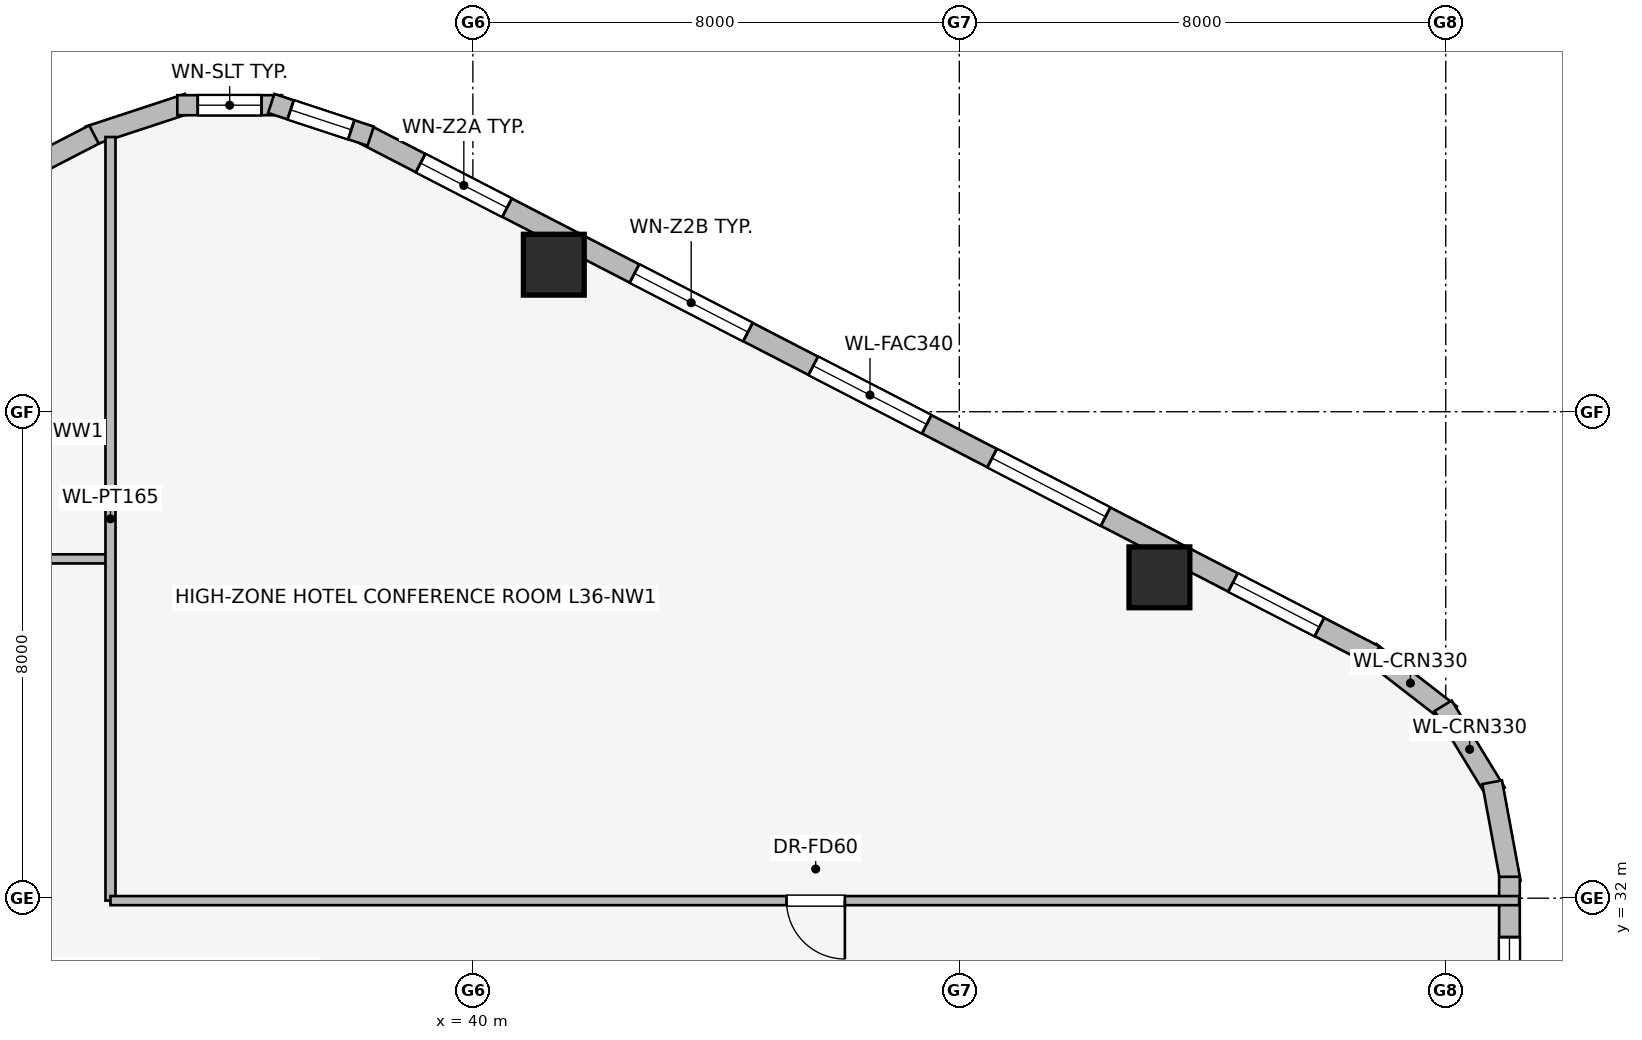
"""IFC4 building model, lengths in metres.
Left out: names, types, materials, properties, quantities, classifications, styles, units other than length and angle.
Written with IfcOpenShell. Run it as: python <this file> out.ifc"""

import sys

from ifc_helpers import new_model, si_unit, direction, frame, frame_2d, origin, origin_2d, place, context, subcontext, project, spatial, rectangle, extrude, element, fill, save


model = new_model("IFC4")
c1 = context("Model", 3, precision=1e-05, world=origin(), true_north=direction((0.0, 1.0)))
c2 = subcontext(c1, "Body", "Model", "MODEL_VIEW")
j1 = project(units=[si_unit("LENGTHUNIT", "METRE"), si_unit("PLANEANGLEUNIT", "RADIAN")], contexts=[c1])
p1 = place(None, origin())
s1 = spatial("IfcSite", under=j1, at=p1, CompositionType="ELEMENT")
p2 = place(p1, origin())
s2 = spatial("IfcBuilding", under=s1, at=p2, CompositionType="ELEMENT")
p3 = place(p2, frame((0.0, 0.0, 136.05)))
s3 = spatial("IfcBuildingStorey", under=s2, at=p3, CompositionType="ELEMENT", Elevation=136.05)
for number, where, z_axis, x_axis in (
    (1, (51.291, 37.277, 0.0), (0.0, 0.0, 1.0), (1.0, 0.0, 0.0)),
    (2, (41.331, 42.418, 0.0), (0.0, 0.0, 1.0), (1.0, 0.0, 0.0)),
):
    element("IfcColumn", number, at=place(p3, frame(where, z_axis=z_axis, x_axis=x_axis)), inside=s3, PredefinedType="COLUMN", context=c2, shape_type="SweptSolid", body=[
        extrude(rectangle(XDim=1.0, YDim=1.0, at=origin_2d()), origin(), (0.0, 0.0, 1.0), 3.45),
    ])
p4 = place(p3, frame((54.757, 36.05, 0.0), z_axis=(0.0, 0.0, 1.0), x_axis=(0.790621329885, -0.612305408053, 0.0)))
e3 = element("IfcWall", 3, at=p4, inside=s3, PredefinedType="STANDARD", context=c2, shape_type="SweptSolid", body=[
    extrude(rectangle(XDim=1.676, YDim=0.33, at=frame_2d((0.838, 0.0))), origin(), (0.0, 0.0, 1.0), 3.16),
])
p5 = place(p3, frame((55.957, 35.164, 0.0), z_axis=(0.0, 0.0, 1.0), x_axis=(0.520519429557, -0.853849824883, 0.0)))
e4 = element("IfcWall", 4, at=p5, inside=s3, PredefinedType="STANDARD", context=c2, shape_type="SweptSolid", body=[
    extrude(rectangle(XDim=1.677, YDim=0.33, at=frame_2d((0.839, 0.0))), origin(), (0.0, 0.0, 1.0), 3.16),
])
p6 = place(p3, frame((56.763, 33.907, 0.0), z_axis=(0.0, 0.0, 1.0), x_axis=(0.181984991895, -0.983301308209, 0.0)))
e5 = element("IfcWall", 5, at=p6, inside=s3, PredefinedType="STANDARD", context=c2, shape_type="SweptSolid", body=[
    extrude(rectangle(XDim=1.677, YDim=0.33, at=frame_2d((0.838, 0.0))), origin(), (0.0, 0.0, 1.0), 3.16),
])
p7 = place(p3, frame((38.231, 44.558, 0.0), z_axis=(0.0, 0.0, 1.0), x_axis=(0.888613612362, -0.458656568606, 0.0)))
e6 = element("IfcWall", 6, at=p7, inside=s3, PredefinedType="STANDARD", context=c2, shape_type="SweptSolid", body=[
    extrude(rectangle(XDim=18.681, YDim=0.34, at=frame_2d((9.34, 0.0))), origin(), (0.0, 0.0, 1.0), 3.16),
])
p8 = place(p7, frame((1.023, 0.0, 0.75)))
e7 = element("IfcOpeningElement", 7, at=p8, cuts=e6, PredefinedType="OPENING", context=c2, shape_type="SweptSolid", body=[
    extrude(rectangle(XDim=1.6, YDim=1.55, at=frame_2d((0.8, 0.775))), frame((0.0, 0.18, 0.0), z_axis=(0.0, -1.0, 0.0), x_axis=(1.0, 0.0, 0.0)), (0.0, 0.0, 1.0), 0.36),
])
p9 = place(p7, frame((4.981, 0.0, 0.75)))
e8 = element("IfcOpeningElement", 8, at=p9, cuts=e6, PredefinedType="OPENING", context=c2, shape_type="SweptSolid", body=[
    extrude(rectangle(XDim=2.1, YDim=1.5, at=frame_2d((1.05, 0.75))), frame((0.0, 0.18, 0.0), z_axis=(0.0, -1.0, 0.0), x_axis=(1.0, 0.0, 0.0)), (0.0, 0.0, 1.0), 0.36),
])
p10 = place(p7, frame((8.29, 0.0, 0.75)))
e9 = element("IfcOpeningElement", 9, at=p10, cuts=e6, PredefinedType="OPENING", context=c2, shape_type="SweptSolid", body=[
    extrude(rectangle(XDim=2.1, YDim=1.5, at=frame_2d((1.05, 0.75))), frame((0.0, 0.18, 0.0), z_axis=(0.0, -1.0, 0.0), x_axis=(1.0, 0.0, 0.0)), (0.0, 0.0, 1.0), 0.36),
])
p11 = place(p7, frame((11.6, 0.0, 0.75)))
e10 = element("IfcOpeningElement", 10, at=p11, cuts=e6, PredefinedType="OPENING", context=c2, shape_type="SweptSolid", body=[
    extrude(rectangle(XDim=2.1, YDim=1.5, at=frame_2d((1.05, 0.75))), frame((0.0, 0.18, 0.0), z_axis=(0.0, -1.0, 0.0), x_axis=(1.0, 0.0, 0.0)), (0.0, 0.0, 1.0), 0.36),
])
p12 = place(p7, frame((16.058, 0.0, 0.75)))
e11 = element("IfcOpeningElement", 11, at=p12, cuts=e6, PredefinedType="OPENING", context=c2, shape_type="SweptSolid", body=[
    extrude(rectangle(XDim=1.6, YDim=1.55, at=frame_2d((0.8, 0.775))), frame((0.0, 0.18, 0.0), z_axis=(0.0, -1.0, 0.0), x_axis=(1.0, 0.0, 0.0)), (0.0, 0.0, 1.0), 0.36),
])
p13 = place(p3, frame((33.681, 44.532, 0.0), z_axis=(0.0, 0.0, 1.0), x_axis=(0.949937416267, 0.312440242569, 0.0)))
e12 = element("IfcWall", 12, at=p13, inside=s3, PredefinedType="STANDARD", context=c2, shape_type="SweptSolid", body=[
    extrude(rectangle(XDim=1.722, YDim=0.33, at=frame_2d((0.861, 0.0))), origin(), (0.0, 0.0, 1.0), 3.16),
])
p14 = place(p3, frame((35.139, 45.041, 0.0), z_axis=(0.0, 0.0, 1.0), x_axis=(1.0, 0.0, 0.0)))
e13 = element("IfcWall", 13, at=p14, inside=s3, PredefinedType="STANDARD", context=c2, shape_type="SweptSolid", body=[
    extrude(rectangle(XDim=1.722, YDim=0.33, at=frame_2d((0.861, 0.0))), origin(), (0.0, 0.0, 1.0), 3.16),
])
p15 = place(p14, frame((0.336, 0.0, 0.75)))
e14 = element("IfcOpeningElement", 14, at=p15, cuts=e13, PredefinedType="OPENING", context=c2, shape_type="SweptSolid", body=[
    extrude(rectangle(XDim=1.05, YDim=1.4, at=frame_2d((0.525, 0.7))), frame((0.0, 0.175, 0.0), z_axis=(0.0, -1.0, 0.0), x_axis=(1.0, 0.0, 0.0)), (0.0, 0.0, 1.0), 0.35),
])
p16 = place(p3, frame((36.683, 45.07, 0.0), z_axis=(0.0, 0.0, 1.0), x_axis=(0.949937416267, -0.312440242569, 0.0)))
e15 = element("IfcWall", 15, at=p16, inside=s3, PredefinedType="STANDARD", context=c2, shape_type="SweptSolid", body=[
    extrude(rectangle(XDim=1.722, YDim=0.33, at=frame_2d((0.861, 0.0))), origin(), (0.0, 0.0, 1.0), 3.16),
])
p17 = place(p16, frame((0.336, 0.0, 0.75)))
e16 = element("IfcOpeningElement", 16, at=p17, cuts=e15, PredefinedType="OPENING", context=c2, shape_type="SweptSolid", body=[
    extrude(rectangle(XDim=1.05, YDim=1.4, at=frame_2d((0.525, 0.7))), frame((0.0, 0.175, 0.0), z_axis=(0.0, -1.0, 0.0), x_axis=(1.0, 0.0, 0.0)), (0.0, 0.0, 1.0), 0.35),
])
p18 = place(p3, frame((17.169, 35.99, 0.0), z_axis=(0.0, 0.0, 1.0), x_axis=(0.888613612362, 0.458656568606, 0.0)))
e17 = element("IfcWall", 17, at=p18, inside=s3, PredefinedType="STANDARD", context=c2, shape_type="SweptSolid", body=[
    extrude(rectangle(XDim=18.681, YDim=0.34, at=frame_2d((9.34, 0.0))), origin(), (0.0, 0.0, 1.0), 3.16),
])
p19 = place(p18, frame((1.023, 0.0, 0.75)))
e18 = element("IfcOpeningElement", 18, at=p19, cuts=e17, PredefinedType="OPENING", context=c2, shape_type="SweptSolid", body=[
    extrude(rectangle(XDim=1.6, YDim=1.55, at=frame_2d((0.8, 0.775))), frame((0.0, 0.18, 0.0), z_axis=(0.0, -1.0, 0.0), x_axis=(1.0, 0.0, 0.0)), (0.0, 0.0, 1.0), 0.36),
])
p20 = place(p18, frame((4.981, 0.0, 0.75)))
e19 = element("IfcOpeningElement", 19, at=p20, cuts=e17, PredefinedType="OPENING", context=c2, shape_type="SweptSolid", body=[
    extrude(rectangle(XDim=2.1, YDim=1.5, at=frame_2d((1.05, 0.75))), frame((0.0, 0.18, 0.0), z_axis=(0.0, -1.0, 0.0), x_axis=(1.0, 0.0, 0.0)), (0.0, 0.0, 1.0), 0.36),
])
p21 = place(p18, frame((8.29, 0.0, 0.75)))
e20 = element("IfcOpeningElement", 20, at=p21, cuts=e17, PredefinedType="OPENING", context=c2, shape_type="SweptSolid", body=[
    extrude(rectangle(XDim=2.1, YDim=1.5, at=frame_2d((1.05, 0.75))), frame((0.0, 0.18, 0.0), z_axis=(0.0, -1.0, 0.0), x_axis=(1.0, 0.0, 0.0)), (0.0, 0.0, 1.0), 0.36),
])
p22 = place(p18, frame((11.6, 0.0, 0.75)))
e21 = element("IfcOpeningElement", 21, at=p22, cuts=e17, PredefinedType="OPENING", context=c2, shape_type="SweptSolid", body=[
    extrude(rectangle(XDim=2.1, YDim=1.5, at=frame_2d((1.05, 0.75))), frame((0.0, 0.18, 0.0), z_axis=(0.0, -1.0, 0.0), x_axis=(1.0, 0.0, 0.0)), (0.0, 0.0, 1.0), 0.36),
])
p23 = place(p18, frame((16.058, 0.0, 0.75)))
e22 = element("IfcOpeningElement", 22, at=p23, cuts=e17, PredefinedType="OPENING", context=c2, shape_type="SweptSolid", body=[
    extrude(rectangle(XDim=1.6, YDim=1.55, at=frame_2d((0.8, 0.775))), frame((0.0, 0.18, 0.0), z_axis=(0.0, -1.0, 0.0), x_axis=(1.0, 0.0, 0.0)), (0.0, 0.0, 1.0), 0.36),
])
p24 = place(p3, frame((57.048, 32.352, 0.0), z_axis=(0.0, 0.0, 1.0), x_axis=(0.0, -1.0, 0.0)))
e23 = element("IfcWall", 23, at=p24, inside=s3, PredefinedType="STANDARD", context=c2, shape_type="SweptSolid", body=[
    extrude(rectangle(XDim=16.704, YDim=0.34, at=frame_2d((8.352, 0.0))), origin(), (0.0, 0.0, 1.0), 3.16),
])
p25 = place(p24, frame((0.992, 0.0, 0.75)))
e24 = element("IfcOpeningElement", 24, at=p25, cuts=e23, PredefinedType="OPENING", context=c2, shape_type="SweptSolid", body=[
    extrude(rectangle(XDim=1.05, YDim=1.4, at=frame_2d((0.525, 0.7))), frame((0.0, 0.18, 0.0), z_axis=(0.0, -1.0, 0.0), x_axis=(1.0, 0.0, 0.0)), (0.0, 0.0, 1.0), 0.36),
])
p26 = place(p24, frame((4.935, 0.0, 0.75)))
e25 = element("IfcOpeningElement", 25, at=p26, cuts=e23, PredefinedType="OPENING", context=c2, shape_type="SweptSolid", body=[
    extrude(rectangle(XDim=2.1, YDim=1.5, at=frame_2d((1.05, 0.75))), frame((0.0, 0.18, 0.0), z_axis=(0.0, -1.0, 0.0), x_axis=(1.0, 0.0, 0.0)), (0.0, 0.0, 1.0), 0.36),
])
p27 = place(p24, frame((9.919, 0.0, 0.75)))
e26 = element("IfcOpeningElement", 26, at=p27, cuts=e23, PredefinedType="OPENING", context=c2, shape_type="SweptSolid", body=[
    extrude(rectangle(XDim=1.6, YDim=1.55, at=frame_2d((0.8, 0.775))), frame((0.0, 0.18, 0.0), z_axis=(0.0, -1.0, 0.0), x_axis=(1.0, 0.0, 0.0)), (0.0, 0.0, 1.0), 0.36),
])
p28 = place(p24, frame((14.702, 0.0, 0.75)))
e27 = element("IfcOpeningElement", 27, at=p28, cuts=e23, PredefinedType="OPENING", context=c2, shape_type="SweptSolid", body=[
    extrude(rectangle(XDim=1.05, YDim=1.4, at=frame_2d((0.525, 0.7))), frame((0.0, 0.18, 0.0), z_axis=(0.0, -1.0, 0.0), x_axis=(1.0, 0.0, 0.0)), (0.0, 0.0, 1.0), 0.36),
])
p29 = place(p3, frame((34.0, 37.58, 0.0), z_axis=(0.0, 0.0, 1.0), x_axis=(-1.0, 0.0, 0.0)))
e28 = element("IfcWall", 28, at=p29, inside=s3, PredefinedType="PARTITIONING", context=c2, shape_type="SweptSolid", body=[
    extrude(rectangle(XDim=13.707, YDim=0.15, at=frame_2d((6.854, 0.0))), origin(), (0.0, 0.0, 1.0), 3.16),
])
p30 = place(p29, frame((5.195, 0.0, 0.0)))
e29 = element("IfcOpeningElement", 29, at=p30, cuts=e28, PredefinedType="OPENING", context=c2, shape_type="SweptSolid", body=[
    extrude(rectangle(XDim=0.96, YDim=2.0, at=frame_2d((0.48, 1.0))), frame((0.0, 0.085, 0.0), z_axis=(0.0, -1.0, 0.0), x_axis=(1.0, 0.0, 0.0)), (0.0, 0.0, 1.0), 0.17),
])
p31 = place(p3, frame((34.04, 31.96, 0.0), z_axis=(0.0, 0.0, 1.0), x_axis=(0.0, 1.0, 0.0)))
e30 = element("IfcWall", 30, at=p31, inside=s3, PredefinedType="PARTITIONING", context=c2, shape_type="SweptSolid", body=[
    extrude(rectangle(XDim=12.558, YDim=0.165, at=frame_2d((6.279, 0.0))), origin(), (0.0, 0.0, 1.0), 3.16),
])
p32 = place(p3, frame((57.208, 31.96, 0.0), z_axis=(0.0, 0.0, 1.0), x_axis=(-1.0, 0.0, 0.0)))
e31 = element("IfcWall", 31, at=p32, inside=s3, PredefinedType="PARTITIONING", context=c2, shape_type="SweptSolid", body=[
    extrude(rectangle(XDim=23.168, YDim=0.15, at=frame_2d((11.584, 0.0))), origin(), (0.0, 0.0, 1.0), 3.16),
])
p33 = place(p32, frame((11.09, 0.0, 0.0)))
e32 = element("IfcOpeningElement", 32, at=p33, cuts=e31, PredefinedType="OPENING", context=c2, shape_type="SweptSolid", body=[
    extrude(rectangle(XDim=0.96, YDim=2.0, at=frame_2d((0.48, 1.0))), frame((0.0, 0.085, 0.0), z_axis=(0.0, -1.0, 0.0), x_axis=(1.0, 0.0, 0.0)), (0.0, 0.0, 1.0), 0.17),
])
p34 = place(p8, origin())
e33 = element("IfcWindow", 33, at=p34, inside=s3, PartitioningType="SINGLE_PANEL", PredefinedType="WINDOW", context=c2, shape_type="SweptSolid", body=[
    extrude(rectangle(XDim=1.6, YDim=1.55, at=frame_2d((0.8, 0.775))), frame((0.0, 0.03, 0.0), z_axis=(0.0, -1.0, 0.0), x_axis=(1.0, 0.0, 0.0)), (0.0, 0.0, 1.0), 0.06),
])
fill(e7, e33)
p35 = place(p9, origin())
e34 = element("IfcWindow", 34, at=p35, inside=s3, PartitioningType="SINGLE_PANEL", PredefinedType="WINDOW", context=c2, shape_type="SweptSolid", body=[
    extrude(rectangle(XDim=2.1, YDim=1.5, at=frame_2d((1.05, 0.75))), frame((0.0, 0.03, 0.0), z_axis=(0.0, -1.0, 0.0), x_axis=(1.0, 0.0, 0.0)), (0.0, 0.0, 1.0), 0.06),
])
fill(e8, e34)
p36 = place(p10, origin())
e35 = element("IfcWindow", 35, at=p36, inside=s3, PartitioningType="SINGLE_PANEL", PredefinedType="WINDOW", context=c2, shape_type="SweptSolid", body=[
    extrude(rectangle(XDim=2.1, YDim=1.5, at=frame_2d((1.05, 0.75))), frame((0.0, 0.03, 0.0), z_axis=(0.0, -1.0, 0.0), x_axis=(1.0, 0.0, 0.0)), (0.0, 0.0, 1.0), 0.06),
])
fill(e9, e35)
p37 = place(p11, origin())
e36 = element("IfcWindow", 36, at=p37, inside=s3, PartitioningType="SINGLE_PANEL", PredefinedType="WINDOW", context=c2, shape_type="SweptSolid", body=[
    extrude(rectangle(XDim=2.1, YDim=1.5, at=frame_2d((1.05, 0.75))), frame((0.0, 0.03, 0.0), z_axis=(0.0, -1.0, 0.0), x_axis=(1.0, 0.0, 0.0)), (0.0, 0.0, 1.0), 0.06),
])
fill(e10, e36)
p38 = place(p12, origin())
e37 = element("IfcWindow", 37, at=p38, inside=s3, PartitioningType="SINGLE_PANEL", PredefinedType="WINDOW", context=c2, shape_type="SweptSolid", body=[
    extrude(rectangle(XDim=1.6, YDim=1.55, at=frame_2d((0.8, 0.775))), frame((0.0, 0.03, 0.0), z_axis=(0.0, -1.0, 0.0), x_axis=(1.0, 0.0, 0.0)), (0.0, 0.0, 1.0), 0.06),
])
fill(e11, e37)
p39 = place(p15, origin())
e38 = element("IfcWindow", 38, at=p39, inside=s3, PartitioningType="SINGLE_PANEL", PredefinedType="WINDOW", context=c2, shape_type="SweptSolid", body=[
    extrude(rectangle(XDim=1.05, YDim=1.4, at=frame_2d((0.525, 0.7))), frame((0.0, 0.03, 0.0), z_axis=(0.0, -1.0, 0.0), x_axis=(1.0, 0.0, 0.0)), (0.0, 0.0, 1.0), 0.06),
])
fill(e14, e38)
p40 = place(p17, origin())
e39 = element("IfcWindow", 39, at=p40, inside=s3, PartitioningType="SINGLE_PANEL", PredefinedType="WINDOW", context=c2, shape_type="SweptSolid", body=[
    extrude(rectangle(XDim=1.05, YDim=1.4, at=frame_2d((0.525, 0.7))), frame((0.0, 0.03, 0.0), z_axis=(0.0, -1.0, 0.0), x_axis=(1.0, 0.0, 0.0)), (0.0, 0.0, 1.0), 0.06),
])
fill(e16, e39)
p41 = place(p25, origin())
e40 = element("IfcWindow", 40, at=p41, inside=s3, PartitioningType="SINGLE_PANEL", PredefinedType="WINDOW", context=c2, shape_type="SweptSolid", body=[
    extrude(rectangle(XDim=1.05, YDim=1.4, at=frame_2d((0.525, 0.7))), frame((0.0, 0.03, 0.0), z_axis=(0.0, -1.0, 0.0), x_axis=(1.0, 0.0, 0.0)), (0.0, 0.0, 1.0), 0.06),
])
fill(e24, e40)
p42 = place(p33, origin())
e41 = element("IfcDoor", 41, at=p42, inside=s3, OperationType="SINGLE_SWING_LEFT", PredefinedType="DOOR", context=c2, shape_type="SweptSolid", body=[
    extrude(rectangle(XDim=0.96, YDim=2.0, at=frame_2d((0.48, 1.0))), frame((0.0, 0.025, 0.0), z_axis=(0.0, -1.0, 0.0), x_axis=(1.0, 0.0, 0.0)), (0.0, 0.0, 1.0), 0.05),
])
fill(e32, e41)
save(model, sys.argv[1])
